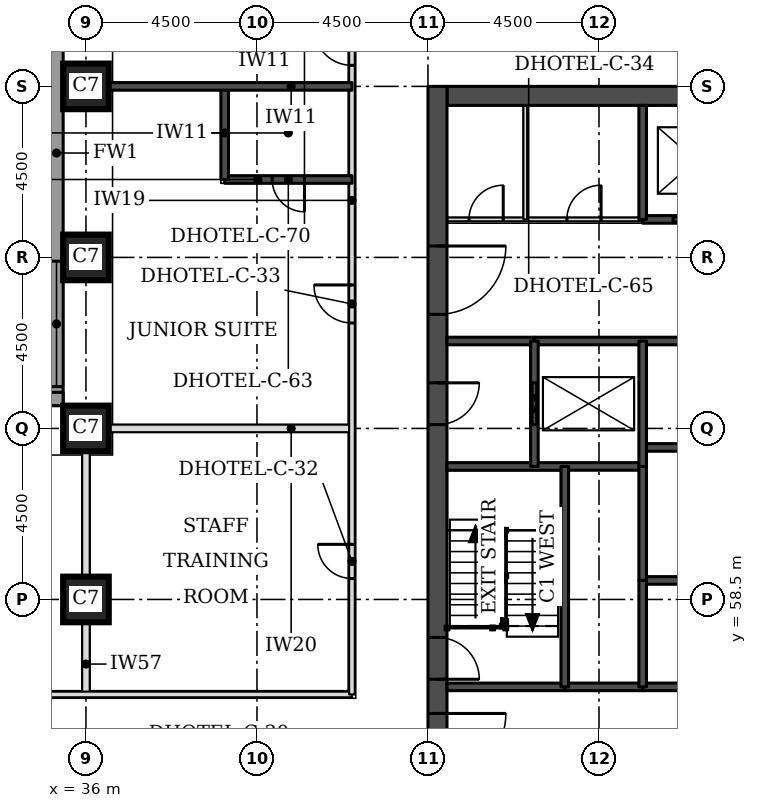
"""IFC4 building model, lengths in metres.
Left out: names, types, materials, properties, quantities, classifications, styles, units other than length and angle.
Written with IfcOpenShell. Run it as: python <this file> out.ifc"""

import sys

from ifc_helpers import new_model, si_unit, direction, frame, frame_2d, origin, origin_2d, place, context, subcontext, project, spatial, rectangle, extrude, element, fill, save


model = new_model("IFC4")
c1 = context("Model", 3, precision=1e-05, world=origin(), true_north=direction((0.0, 1.0)))
c2 = subcontext(c1, "Body", "Model", "MODEL_VIEW")
j1 = project(units=[si_unit("LENGTHUNIT", "METRE"), si_unit("PLANEANGLEUNIT", "RADIAN")], contexts=[c1])
p1 = place(None, origin())
s1 = spatial("IfcSite", under=j1, at=p1, CompositionType="ELEMENT")
p2 = place(p1, origin())
s2 = spatial("IfcBuilding", under=s1, at=p2, CompositionType="ELEMENT")
p3 = place(p2, frame((0.0, 0.0, 33.0)))
s3 = spatial("IfcBuildingStorey", under=s2, at=p3, CompositionType="ELEMENT", Elevation=33.0)
for number, where, z_axis, x_axis in (
    (1, (36.0, 58.5, 0.0), (0.0, 0.0, 1.0), (1.0, 0.0, 0.0)),
    (2, (36.0, 63.0, 0.0), (0.0, 0.0, 1.0), (1.0, 0.0, 0.0)),
    (3, (36.0, 67.5, 0.0), (0.0, 0.0, 1.0), (1.0, 0.0, 0.0)),
    (4, (36.0, 72.0, 0.0), (0.0, 0.0, 1.0), (1.0, 0.0, 0.0)),
):
    element("IfcColumn", number, at=place(p3, frame(where, z_axis=z_axis, x_axis=x_axis)), inside=s3, PredefinedType="COLUMN", context=c2, shape_type="SweptSolid", body=[
        extrude(rectangle(XDim=1.2, YDim=1.2, at=origin_2d()), origin(), (0.0, 0.0, 1.0), 3.3),
    ])
p4 = place(p3, frame((45.5, 71.75, 0.0), z_axis=(0.0, 0.0, 1.0), x_axis=(1.0, 0.0, 0.0)))
e5 = element("IfcWall", 5, at=p4, inside=s3, PredefinedType="SHEAR", context=c2, shape_type="SweptSolid", body=[
    extrude(rectangle(XDim=21.5, YDim=0.5, at=frame_2d((10.75, 0.0))), origin(), (0.0, 0.0, 1.0), 3.3),
])
p5 = place(p3, frame((45.25, 49.5, 0.0), z_axis=(0.0, 0.0, 1.0), x_axis=(0.0, 1.0, 0.0)))
e6 = element("IfcWall", 6, at=p5, inside=s3, PredefinedType="SHEAR", context=c2, shape_type="SweptSolid", body=[
    extrude(rectangle(XDim=22.5, YDim=0.5, at=frame_2d((11.25, 0.0))), origin(), (0.0, 0.0, 1.0), 3.3),
])
p6 = place(p5, frame((4.2, 0.0, 0.0)))
e7 = element("IfcOpeningElement", 7, at=p6, cuts=e6, PredefinedType="OPENING", context=c2, shape_type="SweptSolid", body=[
    extrude(rectangle(XDim=1.8, YDim=2.1, at=frame_2d((0.9, 1.05))), frame((0.0, 0.26, 0.0), z_axis=(0.0, -1.0, 0.0), x_axis=(1.0, 0.0, 0.0)), (0.0, 0.0, 1.0), 0.52),
])
p7 = place(p5, frame((6.9, 0.0, 0.0)))
e8 = element("IfcOpeningElement", 8, at=p7, cuts=e6, PredefinedType="OPENING", context=c2, shape_type="SweptSolid", body=[
    extrude(rectangle(XDim=1.1, YDim=2.1, at=frame_2d((0.55, 1.05))), frame((0.0, 0.26, 0.0), z_axis=(0.0, -1.0, 0.0), x_axis=(1.0, 0.0, 0.0)), (0.0, 0.0, 1.0), 0.52),
])
p8 = place(p5, frame((13.6, 0.0, 0.0)))
e9 = element("IfcOpeningElement", 9, at=p8, cuts=e6, PredefinedType="OPENING", context=c2, shape_type="SweptSolid", body=[
    extrude(rectangle(XDim=1.1, YDim=2.1, at=frame_2d((0.55, 1.05))), frame((0.0, 0.26, 0.0), z_axis=(0.0, -1.0, 0.0), x_axis=(1.0, 0.0, 0.0)), (0.0, 0.0, 1.0), 0.52),
])
p9 = place(p5, frame((16.5, 0.0, 0.0)))
e10 = element("IfcOpeningElement", 10, at=p9, cuts=e6, PredefinedType="OPENING", context=c2, shape_type="SweptSolid", body=[
    extrude(rectangle(XDim=1.8, YDim=2.1, at=frame_2d((0.9, 1.05))), frame((0.0, 0.26, 0.0), z_axis=(0.0, -1.0, 0.0), x_axis=(1.0, 0.0, 0.0)), (0.0, 0.0, 1.0), 0.52),
])
p10 = place(p3, frame((35.225, 76.894, 0.0), z_axis=(0.0, 0.0, 1.0), x_axis=(0.0, -1.0, 0.0)))
e11 = element("IfcWall", 11, at=p10, inside=s3, PredefinedType="STANDARD", context=c2, shape_type="SweptSolid", body=[
    extrude(rectangle(XDim=13.293, YDim=0.35, at=frame_2d((6.647, 0.0))), origin(), (0.0, 0.0, 1.0), 3.055),
])
p11 = place(p10, frame((9.493, 0.0, 0.8)))
e12 = element("IfcOpeningElement", 12, at=p11, cuts=e11, PredefinedType="OPENING", context=c2, shape_type="SweptSolid", body=[
    extrude(rectangle(XDim=3.3, YDim=1.5, at=frame_2d((1.65, 0.75))), frame((0.0, 0.185, 0.0), z_axis=(0.0, -1.0, 0.0), x_axis=(1.0, 0.0, 0.0)), (0.0, 0.0, 1.0), 0.37),
])
p12 = place(p3, frame((35.4, 63.775, 0.0), z_axis=(0.0, 0.0, 1.0), x_axis=(-1.0, 0.0, 0.0)))
e13 = element("IfcWall", 13, at=p12, inside=s3, PredefinedType="STANDARD", context=c2, shape_type="SweptSolid", body=[
    extrude(rectangle(XDim=17.793, YDim=0.35, at=frame_2d((8.897, 0.0))), origin(), (0.0, 0.0, 1.0), 3.055),
])
p13 = place(p12, frame((0.5, 0.0, 0.8)))
e14 = element("IfcOpeningElement", 14, at=p13, cuts=e13, PredefinedType="OPENING", context=c2, shape_type="SweptSolid", body=[
    extrude(rectangle(XDim=3.3, YDim=1.5, at=frame_2d((1.65, 0.75))), frame((0.0, 0.185, 0.0), z_axis=(0.0, -1.0, 0.0), x_axis=(1.0, 0.0, 0.0)), (0.0, 0.0, 1.0), 0.37),
])
p14 = place(p12, frame((9.0, 0.0, 0.8)))
e15 = element("IfcOpeningElement", 15, at=p14, cuts=e13, PredefinedType="OPENING", context=c2, shape_type="SweptSolid", body=[
    extrude(rectangle(XDim=3.3, YDim=1.5, at=frame_2d((1.65, 0.75))), frame((0.0, 0.185, 0.0), z_axis=(0.0, -1.0, 0.0), x_axis=(1.0, 0.0, 0.0)), (0.0, 0.0, 1.0), 0.37),
])
p15 = place(p3, frame((36.0, 56.0, 0.0), z_axis=(0.0, 0.0, 1.0), x_axis=(0.0, 1.0, 0.0)))
e16 = element("IfcWall", 16, at=p15, inside=s3, PredefinedType="PARTITIONING", context=c2, shape_type="SweptSolid", body=[
    extrude(rectangle(XDim=6.4, YDim=0.2, at=frame_2d((3.2, 0.0))), origin(), (0.0, 0.0, 1.0), 2.33),
])
p16 = place(p3, frame((36.6, 63.0, 0.0), z_axis=(0.0, 0.0, 1.0), x_axis=(1.0, 0.0, 0.0)))
e17 = element("IfcWall", 17, at=p16, inside=s3, PredefinedType="PARTITIONING", context=c2, shape_type="SweptSolid", body=[
    extrude(rectangle(XDim=6.4, YDim=0.2, at=frame_2d((3.2, 0.0))), origin(), (0.0, 0.0, 1.0), 3.08),
])
p17 = place(p3, frame((27.0, 56.0, 0.0), z_axis=(0.0, 0.0, 1.0), x_axis=(1.0, 0.0, 0.0)))
e18 = element("IfcWall", 18, at=p17, inside=s3, PredefinedType="PARTITIONING", context=c2, shape_type="SweptSolid", body=[
    extrude(rectangle(XDim=16.0, YDim=0.15, at=frame_2d((8.0, 0.0))), origin(), (0.0, 0.0, 1.0), 3.08),
])
p18 = place(p17, frame((5.225, 0.0, 0.0)))
e19 = element("IfcOpeningElement", 19, at=p18, cuts=e18, PredefinedType="OPENING", context=c2, shape_type="SweptSolid", body=[
    extrude(rectangle(XDim=1.0, YDim=2.1, at=frame_2d((0.5, 1.05))), frame((0.0, 0.085, 0.0), z_axis=(0.0, -1.0, 0.0), x_axis=(1.0, 0.0, 0.0)), (0.0, 0.0, 1.0), 0.17),
])
p19 = place(p3, frame((43.0, 56.0, 0.0), z_axis=(0.0, 0.0, 1.0), x_axis=(0.0, 1.0, 0.0)))
e20 = element("IfcWall", 20, at=p19, inside=s3, PredefinedType="PARTITIONING", context=c2, shape_type="SweptSolid", body=[
    extrude(rectangle(XDim=18.0, YDim=0.15, at=frame_2d((9.0, 0.0))), origin(), (0.0, 0.0, 1.0), 3.08),
])
p20 = place(p19, frame((9.775, 0.0, 0.0)))
e21 = element("IfcOpeningElement", 21, at=p20, cuts=e20, PredefinedType="OPENING", context=c2, shape_type="SweptSolid", body=[
    extrude(rectangle(XDim=1.0, YDim=2.1, at=frame_2d((0.5, 1.05))), frame((0.0, 0.085, 0.0), z_axis=(0.0, -1.0, 0.0), x_axis=(1.0, 0.0, 0.0)), (0.0, 0.0, 1.0), 0.17),
])
p21 = place(p19, frame((16.553, 0.0, 0.0)))
e22 = element("IfcOpeningElement", 22, at=p21, cuts=e20, PredefinedType="OPENING", context=c2, shape_type="SweptSolid", body=[
    extrude(rectangle(XDim=1.0, YDim=2.1, at=frame_2d((0.5, 1.05))), frame((0.0, 0.085, 0.0), z_axis=(0.0, -1.0, 0.0), x_axis=(1.0, 0.0, 0.0)), (0.0, 0.0, 1.0), 0.17),
])
p22 = place(p19, frame((3.05, 0.0, 0.0)))
e23 = element("IfcOpeningElement", 23, at=p22, cuts=e20, PredefinedType="OPENING", context=c2, shape_type="SweptSolid", body=[
    extrude(rectangle(XDim=0.9, YDim=2.1, at=frame_2d((0.45, 1.05))), frame((0.0, 0.085, 0.0), z_axis=(0.0, -1.0, 0.0), x_axis=(1.0, 0.0, 0.0)), (0.0, 0.0, 1.0), 0.17),
])
p23 = place(p3, frame((39.65, 69.55, 0.0), z_axis=(0.0, 0.0, 1.0), x_axis=(1.0, 0.0, 0.0)))
e24 = element("IfcWall", 24, at=p23, inside=s3, PredefinedType="SOLIDWALL", context=c2, shape_type="SweptSolid", body=[
    extrude(rectangle(XDim=3.35, YDim=0.2, at=frame_2d((1.675, 0.0))), origin(), (0.0, 0.0, 1.0), 3.08),
])
p24 = place(p23, frame((1.25, 0.0, 0.0)))
e25 = element("IfcOpeningElement", 25, at=p24, cuts=e24, PredefinedType="OPENING", context=c2, shape_type="SweptSolid", body=[
    extrude(rectangle(XDim=0.85, YDim=2.1, at=frame_2d((0.425, 1.05))), frame((0.0, 0.11, 0.0), z_axis=(0.0, -1.0, 0.0), x_axis=(1.0, 0.0, 0.0)), (0.0, 0.0, 1.0), 0.22),
])
p25 = place(p3, frame((39.65, 69.55, 0.0), z_axis=(0.0, 0.0, 1.0), x_axis=(0.0, 1.0, 0.0)))
e26 = element("IfcWall", 26, at=p25, inside=s3, PredefinedType="SOLIDWALL", context=c2, shape_type="SweptSolid", body=[
    extrude(rectangle(XDim=2.45, YDim=0.2, at=frame_2d((1.225, 0.0))), origin(), (0.0, 0.0, 1.0), 3.08),
])
p26 = place(p3, frame((36.6, 72.0, 0.0), z_axis=(0.0, 0.0, 1.0), x_axis=(1.0, 0.0, 0.0)))
e27 = element("IfcWall", 27, at=p26, inside=s3, PredefinedType="SOLIDWALL", context=c2, shape_type="SweptSolid", body=[
    extrude(rectangle(XDim=6.4, YDim=0.2, at=frame_2d((3.2, 0.0))), origin(), (0.0, 0.0, 1.0), 3.08),
])
p27 = place(p3, frame((48.6, 56.2, 0.0), z_axis=(0.0, 0.0, 1.0), x_axis=(1.0, 0.0, 0.0)))
e28 = element("IfcWall", 28, at=p27, inside=s3, PredefinedType="SOLIDWALL", context=c2, shape_type="SweptSolid", body=[
    extrude(rectangle(XDim=2.05, YDim=0.2, at=frame_2d((1.025, 0.0))), origin(), (0.0, 0.0, 1.0), 3.08),
])
p28 = place(p3, frame((45.5, 56.2, 0.0), z_axis=(0.0, 0.0, 1.0), x_axis=(1.0, 0.0, 0.0)))
e29 = element("IfcWall", 29, at=p28, inside=s3, PredefinedType="SOLIDWALL", context=c2, shape_type="SweptSolid", body=[
    extrude(rectangle(XDim=3.1, YDim=0.2, at=frame_2d((1.55, 0.0))), origin(), (0.0, 0.0, 1.0), 3.08),
])
p29 = place(p3, frame((50.65, 56.2, 0.0), z_axis=(0.0, 0.0, 1.0), x_axis=(1.0, 0.0, 0.0)))
e30 = element("IfcWall", 30, at=p29, inside=s3, PredefinedType="SOLIDWALL", context=c2, shape_type="SweptSolid", body=[
    extrude(rectangle(XDim=11.2, YDim=0.2, at=frame_2d((5.6, 0.0))), origin(), (0.0, 0.0, 1.0), 3.08),
])
p30 = place(p3, frame((50.65, 59.0, 0.0), z_axis=(0.0, 0.0, 1.0), x_axis=(1.0, 0.0, 0.0)))
e31 = element("IfcWall", 31, at=p30, inside=s3, PredefinedType="SOLIDWALL", context=c2, shape_type="SweptSolid", body=[
    extrude(rectangle(XDim=11.2, YDim=0.2, at=frame_2d((5.6, 0.0))), origin(), (0.0, 0.0, 1.0), 3.3),
])
p31 = place(p3, frame((45.5, 62.0, 0.0), z_axis=(0.0, 0.0, 1.0), x_axis=(1.0, 0.0, 0.0)))
e32 = element("IfcWall", 32, at=p31, inside=s3, PredefinedType="SOLIDWALL", context=c2, shape_type="SweptSolid", body=[
    extrude(rectangle(XDim=5.15, YDim=0.2, at=frame_2d((2.575, 0.0))), origin(), (0.0, 0.0, 1.0), 3.08),
])
p32 = place(p3, frame((50.65, 62.5, 0.0), z_axis=(0.0, 0.0, 1.0), x_axis=(1.0, 0.0, 0.0)))
e33 = element("IfcWall", 33, at=p32, inside=s3, PredefinedType="SOLIDWALL", context=c2, shape_type="SweptSolid", body=[
    extrude(rectangle(XDim=11.2, YDim=0.2, at=frame_2d((5.6, 0.0))), origin(), (0.0, 0.0, 1.0), 3.3),
])
p33 = place(p3, frame((45.5, 65.3, 0.0), z_axis=(0.0, 0.0, 1.0), x_axis=(1.0, 0.0, 0.0)))
e34 = element("IfcWall", 34, at=p33, inside=s3, PredefinedType="SOLIDWALL", context=c2, shape_type="SweptSolid", body=[
    extrude(rectangle(XDim=2.3, YDim=0.2, at=frame_2d((1.15, 0.0))), origin(), (0.0, 0.0, 1.0), 3.08),
])
p34 = place(p3, frame((47.8, 65.3, 0.0), z_axis=(0.0, 0.0, 1.0), x_axis=(1.0, 0.0, 0.0)))
e35 = element("IfcWall", 35, at=p34, inside=s3, PredefinedType="SOLIDWALL", context=c2, shape_type="SweptSolid", body=[
    extrude(rectangle(XDim=16.9, YDim=0.2, at=frame_2d((8.45, 0.0))), origin(), (0.0, 0.0, 1.0), 3.08),
])
p35 = place(p3, frame((45.5, 68.5, 0.0), z_axis=(0.0, 0.0, 1.0), x_axis=(1.0, 0.0, 0.0)))
e36 = element("IfcWall", 36, at=p35, inside=s3, PredefinedType="PARTITIONING", context=c2, shape_type="SweptSolid", body=[
    extrude(rectangle(XDim=5.15, YDim=0.1, at=frame_2d((2.575, 0.0))), origin(), (0.0, 0.0, 1.0), 3.08),
])
p36 = place(p35, frame((0.58, 0.0, 0.0)))
e37 = element("IfcOpeningElement", 37, at=p36, cuts=e36, PredefinedType="OPENING", context=c2, shape_type="SweptSolid", body=[
    extrude(rectangle(XDim=0.9, YDim=2.1, at=frame_2d((0.45, 1.05))), frame((0.0, 0.06, 0.0), z_axis=(0.0, -1.0, 0.0), x_axis=(1.0, 0.0, 0.0)), (0.0, 0.0, 1.0), 0.12),
])
p37 = place(p35, frame((3.155, 0.0, 0.0)))
e38 = element("IfcOpeningElement", 38, at=p37, cuts=e36, PredefinedType="OPENING", context=c2, shape_type="SweptSolid", body=[
    extrude(rectangle(XDim=0.9, YDim=2.1, at=frame_2d((0.45, 1.05))), frame((0.0, 0.06, 0.0), z_axis=(0.0, -1.0, 0.0), x_axis=(1.0, 0.0, 0.0)), (0.0, 0.0, 1.0), 0.12),
])
p38 = place(p3, frame((50.65, 68.5, 0.0), z_axis=(0.0, 0.0, 1.0), x_axis=(1.0, 0.0, 0.0)))
e39 = element("IfcWall", 39, at=p38, inside=s3, PredefinedType="SOLIDWALL", context=c2, shape_type="SweptSolid", body=[
    extrude(rectangle(XDim=11.2, YDim=0.2, at=frame_2d((5.6, 0.0))), origin(), (0.0, 0.0, 1.0), 3.08),
])
p39 = place(p38, frame((0.8, 0.0, 0.0)))
e40 = element("IfcOpeningElement", 40, at=p39, cuts=e39, PredefinedType="OPENING", context=c2, shape_type="SweptSolid", body=[
    extrude(rectangle(XDim=1.2, YDim=2.1, at=frame_2d((0.6, 1.05))), frame((0.0, 0.11, 0.0), z_axis=(0.0, -1.0, 0.0), x_axis=(1.0, 0.0, 0.0)), (0.0, 0.0, 1.0), 0.22),
])
p40 = place(p38, frame((3.6, 0.0, 0.0)))
e41 = element("IfcOpeningElement", 41, at=p40, cuts=e39, PredefinedType="OPENING", context=c2, shape_type="SweptSolid", body=[
    extrude(rectangle(XDim=1.2, YDim=2.1, at=frame_2d((0.6, 1.05))), frame((0.0, 0.11, 0.0), z_axis=(0.0, -1.0, 0.0), x_axis=(1.0, 0.0, 0.0)), (0.0, 0.0, 1.0), 0.22),
])
p41 = place(p38, frame((6.4, 0.0, 0.0)))
e42 = element("IfcOpeningElement", 42, at=p41, cuts=e39, PredefinedType="OPENING", context=c2, shape_type="SweptSolid", body=[
    extrude(rectangle(XDim=1.2, YDim=2.1, at=frame_2d((0.6, 1.05))), frame((0.0, 0.11, 0.0), z_axis=(0.0, -1.0, 0.0), x_axis=(1.0, 0.0, 0.0)), (0.0, 0.0, 1.0), 0.22),
])
p42 = place(p38, frame((9.2, 0.0, 0.0)))
e43 = element("IfcOpeningElement", 43, at=p42, cuts=e39, PredefinedType="OPENING", context=c2, shape_type="SweptSolid", body=[
    extrude(rectangle(XDim=1.2, YDim=2.1, at=frame_2d((0.6, 1.05))), frame((0.0, 0.11, 0.0), z_axis=(0.0, -1.0, 0.0), x_axis=(1.0, 0.0, 0.0)), (0.0, 0.0, 1.0), 0.22),
])
p43 = place(p3, frame((47.56, 68.5, 0.0), z_axis=(0.0, 0.0, 1.0), x_axis=(0.0, 1.0, 0.0)))
e44 = element("IfcWall", 44, at=p43, inside=s3, PredefinedType="PARTITIONING", context=c2, shape_type="SweptSolid", body=[
    extrude(rectangle(XDim=3.0, YDim=0.1, at=frame_2d((1.5, 0.0))), origin(), (0.0, 0.0, 1.0), 3.08),
])
p44 = place(p3, frame((47.8, 62.0, 0.0), z_axis=(0.0, 0.0, 1.0), x_axis=(0.0, 1.0, 0.0)))
e45 = element("IfcWall", 45, at=p44, inside=s3, PredefinedType="SOLIDWALL", context=c2, shape_type="SweptSolid", body=[
    extrude(rectangle(XDim=3.3, YDim=0.2, at=frame_2d((1.65, 0.0))), origin(), (0.0, 0.0, 1.0), 3.08),
])
p45 = place(p44, frame((1.1, 0.0, 0.0)))
e46 = element("IfcOpeningElement", 46, at=p45, cuts=e45, PredefinedType="OPENING", context=c2, shape_type="SweptSolid", body=[
    extrude(rectangle(XDim=1.1, YDim=2.1, at=frame_2d((0.55, 1.05))), frame((0.0, 0.11, 0.0), z_axis=(0.0, -1.0, 0.0), x_axis=(1.0, 0.0, 0.0)), (0.0, 0.0, 1.0), 0.22),
])
p46 = place(p3, frame((48.6, 56.2, 0.0), z_axis=(0.0, 0.0, 1.0), x_axis=(0.0, 1.0, 0.0)))
e47 = element("IfcWall", 47, at=p46, inside=s3, PredefinedType="SOLIDWALL", context=c2, shape_type="SweptSolid", body=[
    extrude(rectangle(XDim=5.8, YDim=0.2, at=frame_2d((2.9, 0.0))), origin(), (0.0, 0.0, 1.0), 3.08),
])
p47 = place(p3, frame((50.65, 59.0, 0.0), z_axis=(0.0, 0.0, 1.0), x_axis=(0.0, 1.0, 0.0)))
e48 = element("IfcWall", 48, at=p47, inside=s3, PredefinedType="SOLIDWALL", context=c2, shape_type="SweptSolid", body=[
    extrude(rectangle(XDim=3.0, YDim=0.2, at=frame_2d((1.5, 0.0))), origin(), (0.0, 0.0, 1.0), 3.3),
])
p48 = place(p3, frame((50.65, 56.2, 0.0), z_axis=(0.0, 0.0, 1.0), x_axis=(0.0, 1.0, 0.0)))
e49 = element("IfcWall", 49, at=p48, inside=s3, PredefinedType="SOLIDWALL", context=c2, shape_type="SweptSolid", body=[
    extrude(rectangle(XDim=2.8, YDim=0.2, at=frame_2d((1.4, 0.0))), origin(), (0.0, 0.0, 1.0), 3.08),
])
p49 = place(p3, frame((50.65, 62.0, 0.0), z_axis=(0.0, 0.0, 1.0), x_axis=(0.0, 1.0, 0.0)))
e50 = element("IfcWall", 50, at=p49, inside=s3, PredefinedType="SOLIDWALL", context=c2, shape_type="SweptSolid", body=[
    extrude(rectangle(XDim=3.3, YDim=0.2, at=frame_2d((1.65, 0.0))), origin(), (0.0, 0.0, 1.0), 3.08),
])
p50 = place(p3, frame((50.65, 68.5, 0.0), z_axis=(0.0, 0.0, 1.0), x_axis=(0.0, 1.0, 0.0)))
e51 = element("IfcWall", 51, at=p50, inside=s3, PredefinedType="SOLIDWALL", context=c2, shape_type="SweptSolid", body=[
    extrude(rectangle(XDim=3.0, YDim=0.2, at=frame_2d((1.5, 0.0))), origin(), (0.0, 0.0, 1.0), 3.08),
])
p51 = place(p11, origin())
e52 = element("IfcWindow", 52, at=p51, inside=s3, PartitioningType="SINGLE_PANEL", PredefinedType="WINDOW", context=c2, shape_type="SweptSolid", body=[
    extrude(rectangle(XDim=3.3, YDim=1.5, at=frame_2d((1.65, 0.75))), frame((0.0, 0.085, 0.0), z_axis=(0.0, -1.0, 0.0), x_axis=(1.0, 0.0, 0.0)), (0.0, 0.0, 1.0), 0.06),
])
fill(e12, e52)
p52 = place(p20, origin())
e53 = element("IfcDoor", 53, at=p52, inside=s3, OperationType="SINGLE_SWING_RIGHT", PredefinedType="DOOR", context=c2, shape_type="SweptSolid", body=[
    extrude(rectangle(XDim=1.0, YDim=2.1, at=frame_2d((0.5, 1.05))), frame((0.0, 0.025, 0.0), z_axis=(0.0, -1.0, 0.0), x_axis=(1.0, 0.0, 0.0)), (0.0, 0.0, 1.0), 0.05),
])
fill(e21, e53)
p53 = place(p24, frame((0.85, 0.0, 0.0), z_axis=(0.0, 0.0, 1.0), x_axis=(-1.0, 0.0, 0.0)))
e54 = element("IfcDoor", 54, at=p53, inside=s3, OperationType="SINGLE_SWING_LEFT", PredefinedType="DOOR", context=c2, shape_type="SweptSolid", body=[
    extrude(rectangle(XDim=0.85, YDim=2.1, at=frame_2d((0.425, 1.05))), frame((0.0, 0.025, 0.0), z_axis=(0.0, -1.0, 0.0), x_axis=(1.0, 0.0, 0.0)), (0.0, 0.0, 1.0), 0.05),
])
fill(e25, e54)
p54 = place(p21, origin())
e55 = element("IfcDoor", 55, at=p54, inside=s3, OperationType="SINGLE_SWING_RIGHT", PredefinedType="DOOR", context=c2, shape_type="SweptSolid", body=[
    extrude(rectangle(XDim=1.0, YDim=2.1, at=frame_2d((0.5, 1.05))), frame((0.0, 0.025, 0.0), z_axis=(0.0, -1.0, 0.0), x_axis=(1.0, 0.0, 0.0)), (0.0, 0.0, 1.0), 0.05),
])
fill(e22, e55)
p55 = place(p22, origin())
e56 = element("IfcDoor", 56, at=p55, inside=s3, OperationType="SINGLE_SWING_RIGHT", PredefinedType="DOOR", context=c2, shape_type="SweptSolid", body=[
    extrude(rectangle(XDim=0.9, YDim=2.1, at=frame_2d((0.45, 1.05))), frame((0.0, 0.025, 0.0), z_axis=(0.0, -1.0, 0.0), x_axis=(1.0, 0.0, 0.0)), (0.0, 0.0, 1.0), 0.05),
])
fill(e23, e56)
p56 = place(p39, origin())
e57 = element("IfcDoor", 57, at=p56, inside=s3, OperationType="DOUBLE_DOOR_SLIDING", PredefinedType="DOOR", context=c2, shape_type="SweptSolid", body=[
    extrude(rectangle(XDim=1.2, YDim=2.1, at=frame_2d((0.6, 1.05))), frame((0.0, 0.025, 0.0), z_axis=(0.0, -1.0, 0.0), x_axis=(1.0, 0.0, 0.0)), (0.0, 0.0, 1.0), 0.05),
])
fill(e40, e57)
p57 = place(p45, origin())
e58 = element("IfcDoor", 58, at=p57, inside=s3, OperationType="DOUBLE_DOOR_SLIDING", PredefinedType="DOOR", context=c2, shape_type="SweptSolid", body=[
    extrude(rectangle(XDim=1.1, YDim=2.1, at=frame_2d((0.55, 1.05))), frame((0.0, 0.025, 0.0), z_axis=(0.0, -1.0, 0.0), x_axis=(1.0, 0.0, 0.0)), (0.0, 0.0, 1.0), 0.05),
])
fill(e46, e58)
p58 = place(p6, frame((1.8, 0.0, 0.0), z_axis=(0.0, 0.0, 1.0), x_axis=(-1.0, 0.0, 0.0)))
e59 = element("IfcDoor", 59, at=p58, inside=s3, OperationType="SINGLE_SWING_LEFT", PredefinedType="DOOR", context=c2, shape_type="SweptSolid", body=[
    extrude(rectangle(XDim=1.8, YDim=2.1, at=frame_2d((0.9, 1.05))), frame((0.0, 0.025, 0.0), z_axis=(0.0, -1.0, 0.0), x_axis=(1.0, 0.0, 0.0)), (0.0, 0.0, 1.0), 0.05),
])
fill(e7, e59)
p59 = place(p7, frame((1.1, 0.0, 0.0), z_axis=(0.0, 0.0, 1.0), x_axis=(-1.0, 0.0, 0.0)))
e60 = element("IfcDoor", 60, at=p59, inside=s3, OperationType="SINGLE_SWING_RIGHT", PredefinedType="DOOR", context=c2, shape_type="SweptSolid", body=[
    extrude(rectangle(XDim=1.1, YDim=2.1, at=frame_2d((0.55, 1.05))), frame((0.0, 0.025, 0.0), z_axis=(0.0, -1.0, 0.0), x_axis=(1.0, 0.0, 0.0)), (0.0, 0.0, 1.0), 0.05),
])
fill(e8, e60)
p60 = place(p8, frame((1.1, 0.0, 0.0), z_axis=(0.0, 0.0, 1.0), x_axis=(-1.0, 0.0, 0.0)))
e61 = element("IfcDoor", 61, at=p60, inside=s3, OperationType="SINGLE_SWING_LEFT", PredefinedType="DOOR", context=c2, shape_type="SweptSolid", body=[
    extrude(rectangle(XDim=1.1, YDim=2.1, at=frame_2d((0.55, 1.05))), frame((0.0, 0.025, 0.0), z_axis=(0.0, -1.0, 0.0), x_axis=(1.0, 0.0, 0.0)), (0.0, 0.0, 1.0), 0.05),
])
fill(e9, e61)
p61 = place(p9, frame((1.8, 0.0, 0.0), z_axis=(0.0, 0.0, 1.0), x_axis=(-1.0, 0.0, 0.0)))
e62 = element("IfcDoor", 62, at=p61, inside=s3, OperationType="SINGLE_SWING_LEFT", PredefinedType="DOOR", context=c2, shape_type="SweptSolid", body=[
    extrude(rectangle(XDim=1.8, YDim=2.1, at=frame_2d((0.9, 1.05))), frame((0.0, 0.025, 0.0), z_axis=(0.0, -1.0, 0.0), x_axis=(1.0, 0.0, 0.0)), (0.0, 0.0, 1.0), 0.05),
])
fill(e10, e62)
p62 = place(p36, origin())
e63 = element("IfcDoor", 63, at=p62, inside=s3, OperationType="SINGLE_SWING_RIGHT", PredefinedType="DOOR", context=c2, shape_type="SweptSolid", body=[
    extrude(rectangle(XDim=0.9, YDim=2.1, at=frame_2d((0.45, 1.05))), frame((0.0, 0.025, 0.0), z_axis=(0.0, -1.0, 0.0), x_axis=(1.0, 0.0, 0.0)), (0.0, 0.0, 1.0), 0.05),
])
fill(e37, e63)
p63 = place(p37, origin())
e64 = element("IfcDoor", 64, at=p63, inside=s3, OperationType="SINGLE_SWING_RIGHT", PredefinedType="DOOR", context=c2, shape_type="SweptSolid", body=[
    extrude(rectangle(XDim=0.9, YDim=2.1, at=frame_2d((0.45, 1.05))), frame((0.0, 0.025, 0.0), z_axis=(0.0, -1.0, 0.0), x_axis=(1.0, 0.0, 0.0)), (0.0, 0.0, 1.0), 0.05),
])
fill(e38, e64)
save(model, sys.argv[1])
